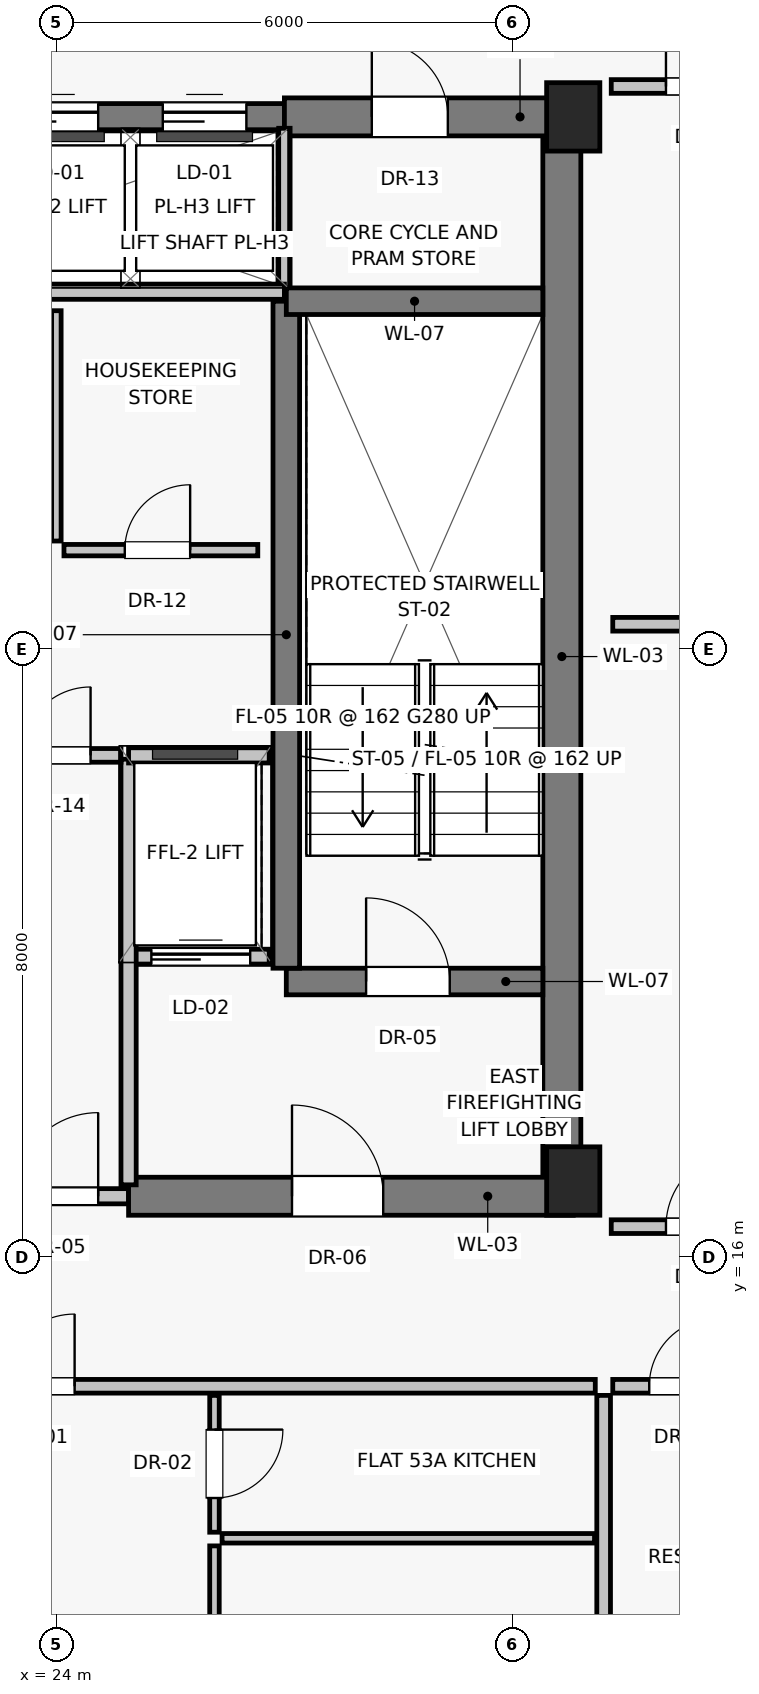
"""IFC4 building model, lengths in metres.
Left out: names, types, materials, properties, quantities, classifications, styles, units other than length and angle.
Written with IfcOpenShell. Run it as: python <this file> out.ifc"""

import sys

from ifc_helpers import new_model, si_unit, direction, frame, frame_2d, origin, origin_2d, place, context, subcontext, project, spatial, rectangle, extrude, source, transform, mapped, element, fill, save


model = new_model("IFC4")
c1 = context("Model", 3, precision=1e-05, world=origin(), true_north=direction((0.0, 1.0)))
c2 = subcontext(c1, "Body", "Model", "MODEL_VIEW")
j1 = project(units=[si_unit("LENGTHUNIT", "METRE"), si_unit("PLANEANGLEUNIT", "RADIAN")], contexts=[c1])
p1 = place(None, origin())
s1 = spatial("IfcSite", under=j1, at=p1, CompositionType="ELEMENT")
p2 = place(p1, origin())
s2 = spatial("IfcBuilding", under=s1, at=p2, CompositionType="ELEMENT")
p3 = place(p2, frame((0.0, 0.0, 188.6)))
s3 = spatial("IfcBuildingStorey", under=s2, at=p3, CompositionType="ELEMENT", Elevation=188.6)
for number, where, z_axis, x_axis in (
    (1, (30.8, 17.0, 0.0), (0.0, 0.0, 1.0), (1.0, 0.0, 0.0)),
    (2, (30.8, 31.0, 0.0), (0.0, 0.0, 1.0), (1.0, 0.0, 0.0)),
):
    element("IfcColumn", number, at=place(p3, frame(where, z_axis=z_axis, x_axis=x_axis)), inside=s3, PredefinedType="PILASTER", context=c2, shape_type="SweptSolid", body=[
        extrude(rectangle(XDim=0.7, YDim=0.9, at=origin_2d()), origin(), (0.0, 0.0, 1.0), 3.25),
    ])
p4 = place(p3, frame((30.65, 16.8, 0.0), z_axis=(0.0, 0.0, 1.0), x_axis=(0.0, 1.0, 0.0)))
e3 = element("IfcWall", 3, at=p4, inside=s3, PredefinedType="SHEAR", context=c2, shape_type="SweptSolid", body=[
    extrude(rectangle(XDim=14.2, YDim=0.5, at=frame_2d((7.1, 0.0))), origin(), (0.0, 0.0, 1.0), 3.015),
])
p5 = place(p3, frame((23.05, 16.8, 0.0), z_axis=(0.0, 0.0, 1.0), x_axis=(1.0, 0.0, 0.0)))
e4 = element("IfcWall", 4, at=p5, inside=s3, PredefinedType="SOLIDWALL", context=c2, shape_type="SweptSolid", body=[
    extrude(rectangle(XDim=1.9, YDim=0.2, at=frame_2d((0.95, 0.0))), origin(), (0.0, 0.0, 1.0), 2.165),
])
p6 = place(p5, frame((0.4, 0.0, 0.0)))
e5 = element("IfcOpeningElement", 5, at=p6, cuts=e4, PredefinedType="OPENING", context=c2, shape_type="SweptSolid", body=[
    extrude(rectangle(XDim=1.1, YDim=2.03, at=frame_2d((0.55, 1.015))), frame((0.0, 0.11, 0.0), z_axis=(0.0, -1.0, 0.0), x_axis=(1.0, 0.0, 0.0)), (0.0, 0.0, 1.0), 0.22),
])
p7 = place(p3, frame((24.95, 16.8, 0.0), z_axis=(0.0, 0.0, 1.0), x_axis=(1.0, 0.0, 0.0)))
e6 = element("IfcWall", 6, at=p7, inside=s3, PredefinedType="SHEAR", context=c2, shape_type="SweptSolid", body=[
    extrude(rectangle(XDim=5.85, YDim=0.5, at=frame_2d((2.925, 0.0))), origin(), (0.0, 0.0, 1.0), 3.015),
])
p8 = place(p7, frame((2.15, 0.0, 0.0)))
e7 = element("IfcOpeningElement", 7, at=p8, cuts=e6, PredefinedType="OPENING", context=c2, shape_type="SweptSolid", body=[
    extrude(rectangle(XDim=1.2, YDim=2.03, at=frame_2d((0.6, 1.015))), frame((0.0, 0.26, 0.0), z_axis=(0.0, -1.0, 0.0), x_axis=(1.0, 0.0, 0.0)), (0.0, 0.0, 1.0), 0.52),
])
p9 = place(p3, frame((21.0, 31.0, 0.0), z_axis=(0.0, 0.0, 1.0), x_axis=(1.0, 0.0, 0.0)))
e8 = element("IfcWall", 8, at=p9, inside=s3, PredefinedType="SHEAR", context=c2, shape_type="SweptSolid", body=[
    extrude(rectangle(XDim=6.0, YDim=0.35, at=frame_2d((3.0, 0.0))), origin(), (0.0, 0.0, 1.0), 3.015),
])
p10 = place(p9, frame((0.5, 0.0, 0.0)))
e9 = element("IfcOpeningElement", 9, at=p10, cuts=e8, PredefinedType="OPENING", context=c2, shape_type="SweptSolid", body=[
    extrude(rectangle(XDim=1.1, YDim=2.08, at=frame_2d((0.55, 1.04))), frame((0.0, 0.185, 0.0), z_axis=(0.0, -1.0, 0.0), x_axis=(1.0, 0.0, 0.0)), (0.0, 0.0, 1.0), 0.37),
])
p11 = place(p9, frame((2.45, 0.0, 0.0)))
e10 = element("IfcOpeningElement", 10, at=p11, cuts=e8, PredefinedType="OPENING", context=c2, shape_type="SweptSolid", body=[
    extrude(rectangle(XDim=1.1, YDim=2.08, at=frame_2d((0.55, 1.04))), frame((0.0, 0.185, 0.0), z_axis=(0.0, -1.0, 0.0), x_axis=(1.0, 0.0, 0.0)), (0.0, 0.0, 1.0), 0.37),
])
p12 = place(p9, frame((4.4, 0.0, 0.0)))
e11 = element("IfcOpeningElement", 11, at=p12, cuts=e8, PredefinedType="OPENING", context=c2, shape_type="SweptSolid", body=[
    extrude(rectangle(XDim=1.1, YDim=2.08, at=frame_2d((0.55, 1.04))), frame((0.0, 0.185, 0.0), z_axis=(0.0, -1.0, 0.0), x_axis=(1.0, 0.0, 0.0)), (0.0, 0.0, 1.0), 0.37),
])
p13 = place(p3, frame((27.0, 31.0, 0.0), z_axis=(0.0, 0.0, 1.0), x_axis=(1.0, 0.0, 0.0)))
e12 = element("IfcWall", 12, at=p13, inside=s3, PredefinedType="SHEAR", context=c2, shape_type="SweptSolid", body=[
    extrude(rectangle(XDim=3.8, YDim=0.5, at=frame_2d((1.9, 0.0))), origin(), (0.0, 0.0, 1.0), 3.015),
])
p14 = place(p13, frame((1.15, 0.0, 0.0)))
e13 = element("IfcOpeningElement", 13, at=p14, cuts=e12, PredefinedType="OPENING", context=c2, shape_type="SweptSolid", body=[
    extrude(rectangle(XDim=1.0, YDim=2.01, at=frame_2d((0.5, 1.005))), frame((0.0, 0.26, 0.0), z_axis=(0.0, -1.0, 0.0), x_axis=(1.0, 0.0, 0.0)), (0.0, 0.0, 1.0), 0.52),
])
p15 = place(p3, frame((27.0, 28.65, 0.0), z_axis=(0.0, 0.0, 1.0), x_axis=(0.0, 1.0, 0.0)))
e14 = element("IfcWall", 14, at=p15, inside=s3, PredefinedType="PARTITIONING", context=c2, shape_type="SweptSolid", body=[
    extrude(rectangle(XDim=2.2, YDim=0.15, at=frame_2d((1.1, 0.0))), origin(), (0.0, 0.0, 1.0), 3.015),
])
p16 = place(p3, frame((24.95, 19.95, 0.0), z_axis=(0.0, 0.0, 1.0), x_axis=(1.0, 0.0, 0.0)))
e15 = element("IfcWall", 15, at=p16, inside=s3, PredefinedType="SOLIDWALL", context=c2, shape_type="SweptSolid", body=[
    extrude(rectangle(XDim=1.85, YDim=0.2, at=frame_2d((0.925, 0.0))), origin(), (0.0, 0.0, 1.0), 3.015),
])
p17 = place(p16, frame((0.3, 0.0, 0.0)))
e16 = element("IfcOpeningElement", 16, at=p17, cuts=e15, PredefinedType="OPENING", context=c2, shape_type="SweptSolid", body=[
    extrude(rectangle(XDim=1.3, YDim=2.25, at=frame_2d((0.65, 1.125))), frame((0.0, 0.11, 0.0), z_axis=(0.0, -1.0, 0.0), x_axis=(1.0, 0.0, 0.0)), (0.0, 0.0, 1.0), 0.22),
])
p18 = place(p3, frame((27.025, 19.625, 0.0), z_axis=(0.0, 0.0, 1.0), x_axis=(1.0, 0.0, 0.0)))
e17 = element("IfcWall", 17, at=p18, inside=s3, PredefinedType="SHEAR", context=c2, shape_type="SweptSolid", body=[
    extrude(rectangle(XDim=3.375, YDim=0.35, at=frame_2d((1.688, 0.0))), origin(), (0.0, 0.0, 1.0), 3.015),
])
p19 = place(p18, frame((1.05, 0.0, 0.0)))
e18 = element("IfcOpeningElement", 18, at=p19, cuts=e17, PredefinedType="OPENING", context=c2, shape_type="SweptSolid", body=[
    extrude(rectangle(XDim=1.1, YDim=2.03, at=frame_2d((0.55, 1.015))), frame((0.0, 0.185, 0.0), z_axis=(0.0, -1.0, 0.0), x_axis=(1.0, 0.0, 0.0)), (0.0, 0.0, 1.0), 0.37),
])
p20 = place(p3, frame((27.025, 19.8, 0.0), z_axis=(0.0, 0.0, 1.0), x_axis=(0.0, 1.0, 0.0)))
e19 = element("IfcWall", 19, at=p20, inside=s3, PredefinedType="SHEAR", context=c2, shape_type="SweptSolid", body=[
    extrude(rectangle(XDim=8.775, YDim=0.35, at=frame_2d((4.387, 0.0))), origin(), (0.0, 0.0, 1.0), 3.015),
])
p21 = place(p3, frame((27.025, 28.575, 0.0), z_axis=(0.0, 0.0, 1.0), x_axis=(1.0, 0.0, 0.0)))
e20 = element("IfcWall", 20, at=p21, inside=s3, PredefinedType="SHEAR", context=c2, shape_type="SweptSolid", body=[
    extrude(rectangle(XDim=3.375, YDim=0.35, at=frame_2d((1.688, 0.0))), origin(), (0.0, 0.0, 1.0), 3.015),
])
p22 = place(p3, frame((24.95, 16.95, 0.0), z_axis=(0.0, 0.0, 1.0), x_axis=(0.0, 1.0, 0.0)))
e21 = element("IfcWall", 21, at=p22, inside=s3, PredefinedType="SOLIDWALL", context=c2, shape_type="SweptSolid", body=[
    extrude(rectangle(XDim=5.6, YDim=0.2, at=frame_2d((2.8, 0.0))), origin(), (0.0, 0.0, 1.0), 3.015),
])
p23 = place(p3, frame((24.95, 22.6, 0.0), z_axis=(0.0, 0.0, 1.0), x_axis=(1.0, 0.0, 0.0)))
e22 = element("IfcWall", 22, at=p23, inside=s3, PredefinedType="SOLIDWALL", context=c2, shape_type="SweptSolid", body=[
    extrude(rectangle(XDim=1.85, YDim=0.2, at=frame_2d((0.925, 0.0))), origin(), (0.0, 0.0, 1.0), 3.015),
])
p24 = place(p3, frame((21.0, 28.7, 0.0), z_axis=(0.0, 0.0, 1.0), x_axis=(1.0, 0.0, 0.0)))
e23 = element("IfcWall", 23, at=p24, inside=s3, PredefinedType="SOLIDWALL", context=c2, shape_type="SweptSolid", body=[
    extrude(rectangle(XDim=6.0, YDim=0.2, at=frame_2d((3.0, 0.0))), origin(), (0.0, 0.0, 1.0), 3.015),
])
p25 = place(p3, frame((23.15, 22.6, 0.0), z_axis=(0.0, 0.0, 1.0), x_axis=(1.0, 0.0, 0.0)))
e24 = element("IfcWall", 24, at=p25, inside=s3, PredefinedType="PARTITIONING", context=c2, shape_type="SweptSolid", body=[
    extrude(rectangle(XDim=1.7, YDim=0.18, at=frame_2d((0.85, 0.0))), origin(), (0.0, 0.0, 1.0), 3.015),
])
p26 = place(p25, frame((0.4, 0.0, 0.0)))
e25 = element("IfcOpeningElement", 25, at=p26, cuts=e24, PredefinedType="OPENING", context=c2, shape_type="SweptSolid", body=[
    extrude(rectangle(XDim=0.9, YDim=2.01, at=frame_2d((0.45, 1.005))), frame((0.0, 0.1, 0.0), z_axis=(0.0, -1.0, 0.0), x_axis=(1.0, 0.0, 0.0)), (0.0, 0.0, 1.0), 0.2),
])
p27 = place(p3, frame((24.1, 25.3, 0.0), z_axis=(0.0, 0.0, 1.0), x_axis=(1.0, 0.0, 0.0)))
e26 = element("IfcWall", 26, at=p27, inside=s3, PredefinedType="PARTITIONING", context=c2, shape_type="SweptSolid", body=[
    extrude(rectangle(XDim=2.55, YDim=0.15, at=frame_2d((1.275, 0.0))), origin(), (0.0, 0.0, 1.0), 3.015),
])
p28 = place(p27, frame((0.8, 0.0, 0.0)))
e27 = element("IfcOpeningElement", 27, at=p28, cuts=e26, PredefinedType="OPENING", context=c2, shape_type="SweptSolid", body=[
    extrude(rectangle(XDim=0.86, YDim=2.01, at=frame_2d((0.43, 1.005))), frame((0.0, 0.085, 0.0), z_axis=(0.0, -1.0, 0.0), x_axis=(1.0, 0.0, 0.0)), (0.0, 0.0, 1.0), 0.17),
])
p29 = place(p3, frame((24.0, 25.42, 0.0), z_axis=(0.0, 0.0, 1.0), x_axis=(0.0, 1.0, 0.0)))
e28 = element("IfcWall", 28, at=p29, inside=s3, PredefinedType="PARTITIONING", context=c2, shape_type="SweptSolid", body=[
    extrude(rectangle(XDim=3.03, YDim=0.125, at=frame_2d((1.515, 0.0))), origin(), (0.0, 0.0, 1.0), 3.015),
])
p30 = place(p3, frame((31.2, 14.18, 0.0), z_axis=(0.0, 0.0, 1.0), x_axis=(0.0, -1.0, 0.0)))
e29 = element("IfcWall", 29, at=p30, inside=s3, PredefinedType="PARTITIONING", context=c2, shape_type="SweptSolid", body=[
    extrude(rectangle(XDim=6.817, YDim=0.18, at=frame_2d((3.409, 0.0))), origin(), (0.0, 0.0, 1.0), 3.015),
])
p31 = place(p3, frame((19.31, 14.3, 0.0), z_axis=(0.0, 0.0, 1.0), x_axis=(1.0, 0.0, 0.0)))
e30 = element("IfcWall", 30, at=p31, inside=s3, PredefinedType="PARTITIONING", context=c2, shape_type="SweptSolid", body=[
    extrude(rectangle(XDim=11.78, YDim=0.18, at=frame_2d((5.89, 0.0))), origin(), (0.0, 0.0, 1.0), 3.015),
])
p32 = place(p31, frame((3.98, 0.0, 0.0)))
e31 = element("IfcOpeningElement", 31, at=p32, cuts=e30, PredefinedType="OPENING", context=c2, shape_type="SweptSolid", body=[
    extrude(rectangle(XDim=0.95, YDim=2.02, at=frame_2d((0.475, 1.01))), frame((0.0, 0.1, 0.0), z_axis=(0.0, -1.0, 0.0), x_axis=(1.0, 0.0, 0.0)), (0.0, 0.0, 1.0), 0.2),
])
p33 = place(p3, frame((26.08, 14.18, 0.0), z_axis=(0.0, 0.0, 1.0), x_axis=(0.0, -1.0, 0.0)))
e32 = element("IfcWall", 32, at=p33, inside=s3, PredefinedType="PARTITIONING", context=c2, shape_type="SweptSolid", body=[
    extrude(rectangle(XDim=1.8, YDim=0.125, at=frame_2d((0.9, 0.0))), origin(), (0.0, 0.0, 1.0), 3.015),
])
p34 = place(p33, frame((0.45, 0.0, 0.0)))
e33 = element("IfcOpeningElement", 33, at=p34, cuts=e32, PredefinedType="OPENING", context=c2, shape_type="SweptSolid", body=[
    extrude(rectangle(XDim=0.9, YDim=2.01, at=frame_2d((0.45, 1.005))), frame((0.0, 0.073, 0.0), z_axis=(0.0, -1.0, 0.0), x_axis=(1.0, 0.0, 0.0)), (0.0, 0.0, 1.0), 0.145),
])
p35 = place(p3, frame((26.18, 12.3, 0.0), z_axis=(0.0, 0.0, 1.0), x_axis=(1.0, 0.0, 0.0)))
e34 = element("IfcWall", 34, at=p35, inside=s3, PredefinedType="PARTITIONING", context=c2, shape_type="SweptSolid", body=[
    extrude(rectangle(XDim=4.9, YDim=0.125, at=frame_2d((2.45, 0.0))), origin(), (0.0, 0.0, 1.0), 3.015),
])
p36 = place(p3, frame((26.08, 12.2, 0.0), z_axis=(0.0, 0.0, 1.0), x_axis=(0.0, -1.0, 0.0)))
e35 = element("IfcWall", 35, at=p36, inside=s3, PredefinedType="PARTITIONING", context=c2, shape_type="SweptSolid", body=[
    extrude(rectangle(XDim=7.463, YDim=0.125, at=frame_2d((3.732, 0.0))), origin(), (0.0, 0.0, 1.0), 3.015),
])
p37 = place(p36, frame((2.296, 0.0, 0.0)))
e36 = element("IfcOpeningElement", 36, at=p37, cuts=e35, PredefinedType="OPENING", context=c2, shape_type="SweptSolid", body=[
    extrude(rectangle(XDim=0.9, YDim=2.01, at=frame_2d((0.45, 1.005))), frame((0.0, 0.073, 0.0), z_axis=(0.0, -1.0, 0.0), x_axis=(1.0, 0.0, 0.0)), (0.0, 0.0, 1.0), 0.145),
])
p38 = place(p3, frame((31.32, 24.325, 0.0), z_axis=(0.0, 0.0, 1.0), x_axis=(1.0, 0.0, 0.0)))
e37 = element("IfcWall", 37, at=p38, inside=s3, PredefinedType="PARTITIONING", context=c2, shape_type="SweptSolid", body=[
    extrude(rectangle(XDim=10.466, YDim=0.18, at=frame_2d((5.233, 0.0))), origin(), (0.0, 0.0, 1.0), 3.015),
])
p39 = place(p3, frame((31.3, 16.4, 0.0), z_axis=(0.0, 0.0, 1.0), x_axis=(1.0, 0.0, 0.0)))
e38 = element("IfcWall", 38, at=p39, inside=s3, PredefinedType="PARTITIONING", context=c2, shape_type="SweptSolid", body=[
    extrude(rectangle(XDim=1.92, YDim=0.18, at=frame_2d((0.96, 0.0))), origin(), (0.0, 0.0, 1.0), 3.015),
])
p40 = place(p39, frame((0.72, 0.0, 0.0)))
e39 = element("IfcOpeningElement", 39, at=p40, cuts=e38, PredefinedType="OPENING", context=c2, shape_type="SweptSolid", body=[
    extrude(rectangle(XDim=1.0, YDim=2.01, at=frame_2d((0.5, 1.005))), frame((0.0, 0.1, 0.0), z_axis=(0.0, -1.0, 0.0), x_axis=(1.0, 0.0, 0.0)), (0.0, 0.0, 1.0), 0.2),
])
p41 = place(p3, frame((31.3, 31.4, 0.0), z_axis=(0.0, 0.0, 1.0), x_axis=(1.0, 0.0, 0.0)))
e40 = element("IfcWall", 40, at=p41, inside=s3, PredefinedType="PARTITIONING", context=c2, shape_type="SweptSolid", body=[
    extrude(rectangle(XDim=1.92, YDim=0.18, at=frame_2d((0.96, 0.0))), origin(), (0.0, 0.0, 1.0), 3.015),
])
p42 = place(p41, frame((0.72, 0.0, 0.0)))
e41 = element("IfcOpeningElement", 41, at=p42, cuts=e40, PredefinedType="OPENING", context=c2, shape_type="SweptSolid", body=[
    extrude(rectangle(XDim=1.0, YDim=2.01, at=frame_2d((0.5, 1.005))), frame((0.0, 0.1, 0.0), z_axis=(0.0, -1.0, 0.0), x_axis=(1.0, 0.0, 0.0)), (0.0, 0.0, 1.0), 0.2),
])
p43 = place(p3, frame((31.32, 14.3, 0.0), z_axis=(0.0, 0.0, 1.0), x_axis=(1.0, 0.0, 0.0)))
e42 = element("IfcWall", 42, at=p43, inside=s3, PredefinedType="PARTITIONING", context=c2, shape_type="SweptSolid", body=[
    extrude(rectangle(XDim=1.86, YDim=0.18, at=frame_2d((0.93, 0.0))), origin(), (0.0, 0.0, 1.0), 3.015),
])
p44 = place(p43, frame((0.48, 0.0, 0.0)))
e43 = element("IfcOpeningElement", 43, at=p44, cuts=e42, PredefinedType="OPENING", context=c2, shape_type="SweptSolid", body=[
    extrude(rectangle(XDim=0.9, YDim=2.01, at=frame_2d((0.45, 1.005))), frame((0.0, 0.1, 0.0), z_axis=(0.0, -1.0, 0.0), x_axis=(1.0, 0.0, 0.0)), (0.0, 0.0, 1.0), 0.2),
])
m1 = source(origin(), c2, "Body", "SweptSolid", [
    extrude(rectangle(XDim=1.1, YDim=2.03, at=frame_2d((0.55, 1.015))), frame((0.0, 0.025, 0.0), z_axis=(0.0, -1.0, 0.0), x_axis=(1.0, 0.0, 0.0)), (0.0, 0.0, 1.0), 0.05),
])
p45 = place(p6, origin())
e44 = element("IfcDoor", 44, at=p45, inside=s3, OperationType="SINGLE_SWING_RIGHT", PredefinedType="DOOR", context=c2, shape_type="MappedRepresentation", body=[
    mapped(m1, transform((0.0, 0.0, 0.0), scale=1.0)),
])
fill(e5, e44)
m2 = source(origin(), c2, "Body", "SweptSolid", [
    extrude(rectangle(XDim=1.2, YDim=2.03, at=frame_2d((0.6, 1.015))), frame((0.0, 0.025, 0.0), z_axis=(0.0, -1.0, 0.0), x_axis=(1.0, 0.0, 0.0)), (0.0, 0.0, 1.0), 0.05),
])
p46 = place(p8, origin())
e45 = element("IfcDoor", 45, at=p46, inside=s3, OperationType="SINGLE_SWING_LEFT", PredefinedType="DOOR", context=c2, shape_type="MappedRepresentation", body=[
    mapped(m2, transform((0.0, 0.0, 0.0), scale=1.0)),
])
fill(e7, e45)
m3 = source(origin(), c2, "Body", "SweptSolid", [
    extrude(rectangle(XDim=1.1, YDim=2.08, at=frame_2d((0.55, 1.04))), frame((0.0, 0.025, 0.0), z_axis=(0.0, -1.0, 0.0), x_axis=(1.0, 0.0, 0.0)), (0.0, 0.0, 1.0), 0.05),
])
p47 = place(p11, origin())
e46 = element("IfcDoor", 46, at=p47, inside=s3, OperationType="SLIDING_TO_LEFT", PredefinedType="DOOR", context=c2, shape_type="MappedRepresentation", body=[
    mapped(m3, transform((0.0, 0.0, 0.0), scale=1.0)),
])
fill(e10, e46)
p48 = place(p12, origin())
e47 = element("IfcDoor", 47, at=p48, inside=s3, OperationType="SLIDING_TO_LEFT", PredefinedType="DOOR", context=c2, shape_type="MappedRepresentation", body=[
    mapped(m3, transform((0.0, 0.0, 0.0), scale=1.0)),
])
fill(e11, e47)
m4 = source(origin(), c2, "Body", "SweptSolid", [
    extrude(rectangle(XDim=1.0, YDim=2.01, at=frame_2d((0.5, 1.005))), frame((0.0, 0.025, 0.0), z_axis=(0.0, -1.0, 0.0), x_axis=(1.0, 0.0, 0.0)), (0.0, 0.0, 1.0), 0.05),
])
p49 = place(p14, origin())
e48 = element("IfcDoor", 48, at=p49, inside=s3, OperationType="SINGLE_SWING_LEFT", PredefinedType="DOOR", context=c2, shape_type="MappedRepresentation", body=[
    mapped(m4, transform((0.0, 0.0, 0.0), scale=1.0)),
])
fill(e13, e48)
m5 = source(origin(), c2, "Body", "SweptSolid", [
    extrude(rectangle(XDim=1.3, YDim=2.25, at=frame_2d((0.65, 1.125))), frame((0.0, 0.025, 0.0), z_axis=(0.0, -1.0, 0.0), x_axis=(1.0, 0.0, 0.0)), (0.0, 0.0, 1.0), 0.05),
])
p50 = place(p17, origin())
e49 = element("IfcDoor", 49, at=p50, inside=s3, OperationType="SLIDING_TO_LEFT", PredefinedType="DOOR", context=c2, shape_type="MappedRepresentation", body=[
    mapped(m5, transform((0.0, 0.0, 0.0), scale=1.0)),
])
fill(e16, e49)
p51 = place(p19, origin())
e50 = element("IfcDoor", 50, at=p51, inside=s3, OperationType="SINGLE_SWING_LEFT", PredefinedType="DOOR", context=c2, shape_type="MappedRepresentation", body=[
    mapped(m1, transform((0.0, 0.0, 0.0), scale=1.0)),
])
fill(e18, e50)
m6 = source(origin(), c2, "Body", "SweptSolid", [
    extrude(rectangle(XDim=0.9, YDim=2.01, at=frame_2d((0.45, 1.005))), frame((0.0, 0.025, 0.0), z_axis=(0.0, -1.0, 0.0), x_axis=(1.0, 0.0, 0.0)), (0.0, 0.0, 1.0), 0.05),
])
p52 = place(p26, origin())
e51 = element("IfcDoor", 51, at=p52, inside=s3, OperationType="SINGLE_SWING_RIGHT", PredefinedType="DOOR", context=c2, shape_type="MappedRepresentation", body=[
    mapped(m6, transform((0.0, 0.0, 0.0), scale=1.0)),
])
fill(e25, e51)
m7 = source(origin(), c2, "Body", "SweptSolid", [
    extrude(rectangle(XDim=0.86, YDim=2.01, at=frame_2d((0.43, 1.005))), frame((0.0, 0.025, 0.0), z_axis=(0.0, -1.0, 0.0), x_axis=(1.0, 0.0, 0.0)), (0.0, 0.0, 1.0), 0.05),
])
p53 = place(p28, origin())
e52 = element("IfcDoor", 52, at=p53, inside=s3, OperationType="SINGLE_SWING_RIGHT", PredefinedType="DOOR", context=c2, shape_type="MappedRepresentation", body=[
    mapped(m7, transform((0.0, 0.0, 0.0), scale=1.0)),
])
fill(e27, e52)
m8 = source(origin(), c2, "Body", "SweptSolid", [
    extrude(rectangle(XDim=0.95, YDim=2.02, at=frame_2d((0.475, 1.01))), frame((0.0, 0.025, 0.0), z_axis=(0.0, -1.0, 0.0), x_axis=(1.0, 0.0, 0.0)), (0.0, 0.0, 1.0), 0.05),
])
p54 = place(p32, origin())
e53 = element("IfcDoor", 53, at=p54, inside=s3, OperationType="SINGLE_SWING_RIGHT", PredefinedType="DOOR", context=c2, shape_type="MappedRepresentation", body=[
    mapped(m8, transform((0.0, 0.0, 0.0), scale=1.0)),
])
fill(e31, e53)
p55 = place(p34, origin())
e54 = element("IfcDoor", 54, at=p55, inside=s3, OperationType="SINGLE_SWING_LEFT", PredefinedType="DOOR", context=c2, shape_type="MappedRepresentation", body=[
    mapped(m6, transform((0.0, 0.0, 0.0), scale=1.0)),
])
fill(e33, e54)
p56 = place(p40, origin())
e55 = element("IfcDoor", 55, at=p56, inside=s3, OperationType="SINGLE_SWING_RIGHT", PredefinedType="DOOR", context=c2, shape_type="MappedRepresentation", body=[
    mapped(m4, transform((0.0, 0.0, 0.0), scale=1.0)),
])
fill(e39, e55)
p57 = place(p42, origin())
e56 = element("IfcDoor", 56, at=p57, inside=s3, OperationType="SINGLE_SWING_LEFT", PredefinedType="DOOR", context=c2, shape_type="MappedRepresentation", body=[
    mapped(m4, transform((0.0, 0.0, 0.0), scale=1.0)),
])
fill(e41, e56)
p58 = place(p44, origin())
e57 = element("IfcDoor", 57, at=p58, inside=s3, OperationType="SINGLE_SWING_RIGHT", PredefinedType="DOOR", context=c2, shape_type="MappedRepresentation", body=[
    mapped(m6, transform((0.0, 0.0, 0.0), scale=1.0)),
])
fill(e43, e57)
save(model, sys.argv[1])
